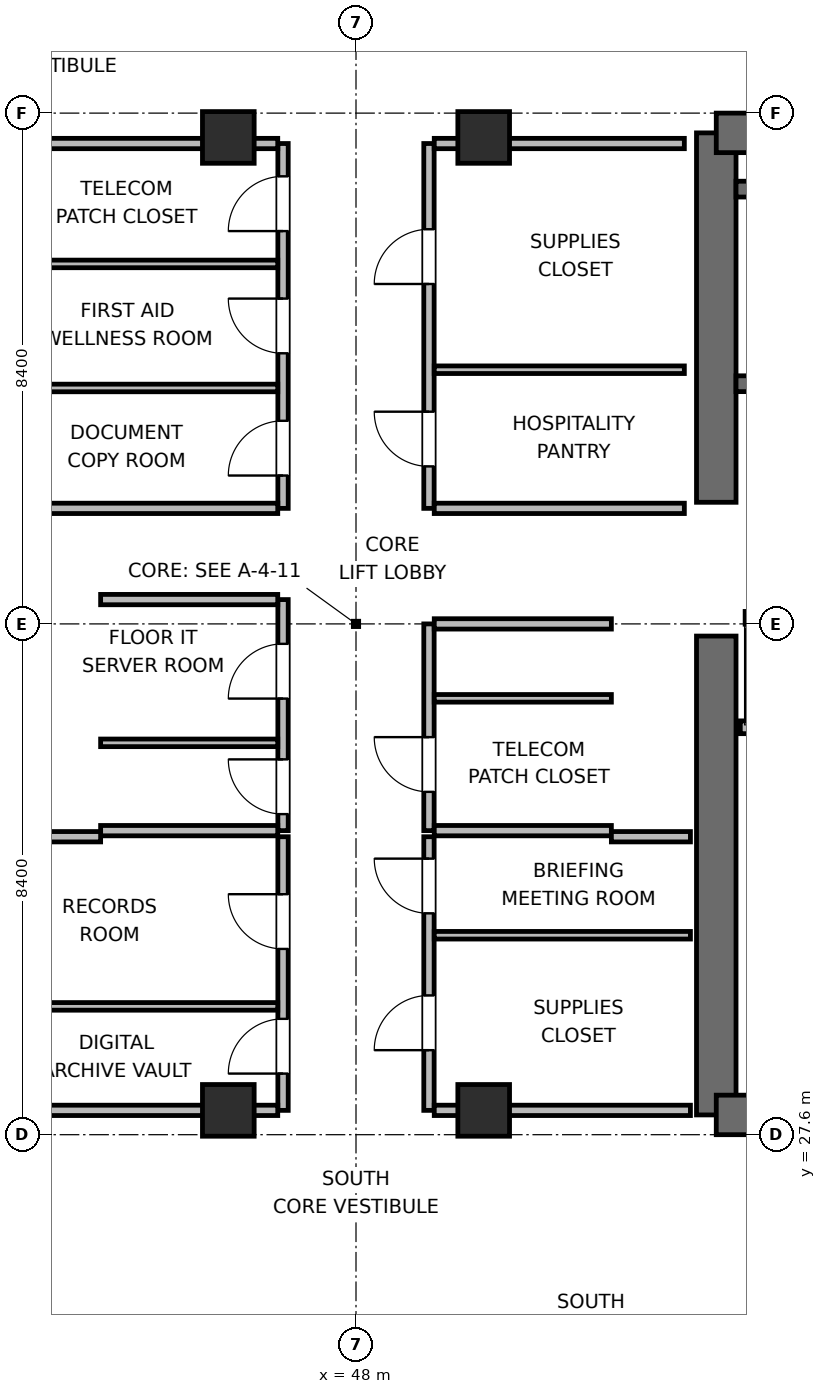
"""IFC4 building model, lengths in metres.
Left out: names, types, materials, properties, quantities, classifications, styles, units other than length and angle.
Written with IfcOpenShell. Run it as: python <this file> out.ifc"""

import sys

from ifc_helpers import new_model, si_unit, direction, frame, frame_2d, origin, origin_2d, place, context, subcontext, project, spatial, rectangle, extrude, element, fill, save


model = new_model("IFC4")
c1 = context("Model", 3, precision=1e-05, world=origin(), true_north=direction((0.0, 1.0)))
c2 = subcontext(c1, "Body", "Model", "MODEL_VIEW")
j1 = project(units=[si_unit("LENGTHUNIT", "METRE"), si_unit("PLANEANGLEUNIT", "RADIAN")], contexts=[c1])
p1 = place(None, origin())
s1 = spatial("IfcSite", under=j1, at=p1, CompositionType="ELEMENT")
p2 = place(p1, origin())
s2 = spatial("IfcBuilding", under=s1, at=p2, CompositionType="ELEMENT")
p3 = place(p2, frame((0.0, 0.0, 219.3)))
s3 = spatial("IfcBuildingStorey", under=s2, at=p3, CompositionType="ELEMENT", Elevation=219.3)
p4 = place(p3, frame((53.925, 27.925, 0.0), z_axis=(0.0, 0.0, 1.0), x_axis=(0.0, 1.0, 0.0)))
e1 = element("IfcWall", 1, at=p4, inside=s3, PredefinedType="SHEAR", context=c2, shape_type="SweptSolid", body=[
    extrude(rectangle(XDim=7.875, YDim=0.65, at=frame_2d((3.938, 0.0))), origin(), (0.0, 0.0, 1.0), 3.9),
])
p5 = place(p3, frame((53.925, 38.0, 0.0), z_axis=(0.0, 0.0, 1.0), x_axis=(0.0, 1.0, 0.0)))
e2 = element("IfcWall", 2, at=p5, inside=s3, PredefinedType="SHEAR", context=c2, shape_type="SweptSolid", body=[
    extrude(rectangle(XDim=6.075, YDim=0.65, at=frame_2d((3.038, 0.0))), origin(), (0.0, 0.0, 1.0), 3.9),
])
p6 = place(p3, frame((53.925, 27.925, 0.0), z_axis=(0.0, 0.0, 1.0), x_axis=(1.0, 0.0, 0.0)))
e3 = element("IfcWall", 3, at=p6, inside=s3, PredefinedType="SHEAR", context=c2, shape_type="SweptSolid", body=[
    extrude(rectangle(XDim=9.35, YDim=0.65, at=frame_2d((4.675, 0.0))), origin(), (0.0, 0.0, 1.0), 3.9),
])
p7 = place(p6, frame((3.975, 0.0, 0.0)))
e4 = element("IfcOpeningElement", 4, at=p7, cuts=e3, PredefinedType="OPENING", context=c2, shape_type="SweptSolid", body=[
    extrude(rectangle(XDim=1.05, YDim=2.04, at=frame_2d((0.525, 1.02))), frame((0.0, 0.335, 0.0), z_axis=(0.0, -1.0, 0.0), x_axis=(1.0, 0.0, 0.0)), (0.0, 0.0, 1.0), 0.67),
])
p8 = place(p3, frame((53.925, 44.075, 0.0), z_axis=(0.0, 0.0, 1.0), x_axis=(1.0, 0.0, 0.0)))
e5 = element("IfcWall", 5, at=p8, inside=s3, PredefinedType="SHEAR", context=c2, shape_type="SweptSolid", body=[
    extrude(rectangle(XDim=9.35, YDim=0.65, at=frame_2d((4.675, 0.0))), origin(), (0.0, 0.0, 1.0), 3.9),
])
p9 = place(p3, frame((54.25, 39.95, 0.0), z_axis=(0.0, 0.0, 1.0), x_axis=(1.0, 0.0, 0.0)))
e6 = element("IfcWall", 6, at=p9, inside=s3, PredefinedType="SHEAR", context=c2, shape_type="SweptSolid", body=[
    extrude(rectangle(XDim=8.7, YDim=0.26, at=frame_2d((4.35, 0.0))), origin(), (0.0, 0.0, 1.0), 3.9),
])
p10 = place(p9, frame((0.95, 0.0, 0.0)))
e7 = element("IfcOpeningElement", 7, at=p10, cuts=e6, PredefinedType="OPENING", context=c2, shape_type="SweptSolid", body=[
    extrude(rectangle(XDim=1.0, YDim=2.04, at=frame_2d((0.5, 1.02))), frame((0.0, 0.14, 0.0), z_axis=(0.0, -1.0, 0.0), x_axis=(1.0, 0.0, 0.0)), (0.0, 0.0, 1.0), 0.28),
])
p11 = place(p3, frame((54.25, 43.15, 0.0), z_axis=(0.0, 0.0, 1.0), x_axis=(1.0, 0.0, 0.0)))
e8 = element("IfcWall", 8, at=p11, inside=s3, PredefinedType="SHEAR", context=c2, shape_type="SweptSolid", body=[
    extrude(rectangle(XDim=8.7, YDim=0.26, at=frame_2d((4.35, 0.0))), origin(), (0.0, 0.0, 1.0), 3.9),
])
for number, where, z_axis, x_axis in (
    (9, (45.9, 28.0, 0.0), (0.0, 0.0, 1.0), (1.0, 0.0, 0.0)),
    (10, (50.1, 28.0, 0.0), (0.0, 0.0, 1.0), (1.0, 0.0, 0.0)),
    (11, (45.9, 44.0, 0.0), (0.0, 0.0, 1.0), (1.0, 0.0, 0.0)),
    (12, (50.1, 44.0, 0.0), (0.0, 0.0, 1.0), (1.0, 0.0, 0.0)),
):
    element("IfcColumn", number, at=place(p3, frame(where, z_axis=z_axis, x_axis=x_axis)), inside=s3, PredefinedType="COLUMN", context=c2, shape_type="SweptSolid", body=[
        extrude(rectangle(XDim=0.85, YDim=0.85, at=origin_2d()), origin(), (0.0, 0.0, 1.0), 3.9),
    ])
p12 = place(p3, frame((54.32, 34.3, 0.0), z_axis=(0.0, 0.0, 1.0), x_axis=(1.0, 0.0, 0.0)))
e13 = element("IfcWall", 13, at=p12, inside=s3, PredefinedType="PARTITIONING", context=c2, shape_type="SweptSolid", body=[
    extrude(rectangle(XDim=3.48, YDim=0.21, at=frame_2d((1.74, 0.0))), origin(), (0.0, 0.0, 1.0), 3.68),
])
p13 = place(p3, frame((54.4, 36.1, 0.0), z_axis=(0.0, 0.0, 1.0), x_axis=(1.0, 0.0, 0.0)))
e14 = element("IfcWall", 14, at=p13, inside=s3, PredefinedType="PARTITIONING", context=c2, shape_type="SweptSolid", body=[
    extrude(rectangle(XDim=2.1, YDim=0.21, at=frame_2d((1.05, 0.0))), origin(), (0.0, 0.0, 1.0), 3.68),
])
p14 = place(p13, frame((0.5, 0.0, 0.0)))
e15 = element("IfcOpeningElement", 15, at=p14, cuts=e14, PredefinedType="OPENING", context=c2, shape_type="SweptSolid", body=[
    extrude(rectangle(XDim=1.1, YDim=2.04, at=frame_2d((0.55, 1.02))), frame((0.0, 0.115, 0.0), z_axis=(0.0, -1.0, 0.0), x_axis=(1.0, 0.0, 0.0)), (0.0, 0.0, 1.0), 0.23),
])
p15 = place(p3, frame((46.8, 32.6, 0.0), z_axis=(0.0, 0.0, 1.0), x_axis=(0.0, 1.0, 0.0)))
e16 = element("IfcWall", 16, at=p15, inside=s3, PredefinedType="PARTITIONING", context=c2, shape_type="SweptSolid", body=[
    extrude(rectangle(XDim=3.8, YDim=0.17, at=frame_2d((1.9, 0.0))), origin(), (0.0, 0.0, 1.0), 3.68),
])
p16 = place(p15, frame((0.272, 0.0, 0.0)))
e17 = element("IfcOpeningElement", 17, at=p16, cuts=e16, PredefinedType="OPENING", context=c2, shape_type="SweptSolid", body=[
    extrude(rectangle(XDim=0.9, YDim=2.02, at=frame_2d((0.45, 1.01))), frame((0.0, 0.095, 0.0), z_axis=(0.0, -1.0, 0.0), x_axis=(1.0, 0.0, 0.0)), (0.0, 0.0, 1.0), 0.19),
])
p17 = place(p15, frame((2.172, 0.0, 0.0)))
e18 = element("IfcOpeningElement", 18, at=p17, cuts=e16, PredefinedType="OPENING", context=c2, shape_type="SweptSolid", body=[
    extrude(rectangle(XDim=0.9, YDim=2.02, at=frame_2d((0.45, 1.01))), frame((0.0, 0.095, 0.0), z_axis=(0.0, -1.0, 0.0), x_axis=(1.0, 0.0, 0.0)), (0.0, 0.0, 1.0), 0.19),
])
for number, where, z_axis, x_axis in (
    (19, (43.8, 32.6, 0.0), (0.0, 0.0, 1.0), (1.0, 0.0, 0.0)),
    (20, (43.8, 36.4, 0.0), (0.0, 0.0, 1.0), (1.0, 0.0, 0.0)),
):
    element("IfcWall", number, at=place(p3, frame(where, z_axis=z_axis, x_axis=x_axis)), inside=s3, PredefinedType="PARTITIONING", context=c2, shape_type="SweptSolid", body=[
        extrude(rectangle(XDim=2.913, YDim=0.17, at=frame_2d((1.457, 0.0))), origin(), (0.0, 0.0, 1.0), 3.68),
    ])
p18 = place(p3, frame((43.8, 34.044, 0.0), z_axis=(0.0, 0.0, 1.0), x_axis=(1.0, 0.0, 0.0)))
e21 = element("IfcWall", 21, at=p18, inside=s3, PredefinedType="PARTITIONING", context=c2, shape_type="SweptSolid", body=[
    extrude(rectangle(XDim=2.913, YDim=0.125, at=frame_2d((1.457, 0.0))), origin(), (0.0, 0.0, 1.0), 3.68),
])
p19 = place(p3, frame((49.2, 32.6, 0.0), z_axis=(0.0, 0.0, 1.0), x_axis=(0.0, 1.0, 0.0)))
e22 = element("IfcWall", 22, at=p19, inside=s3, PredefinedType="PARTITIONING", context=c2, shape_type="SweptSolid", body=[
    extrude(rectangle(XDim=3.4, YDim=0.17, at=frame_2d((1.7, 0.0))), origin(), (0.0, 0.0, 1.0), 3.68),
])
p20 = place(p19, frame((0.638, 0.0, 0.0)))
e23 = element("IfcOpeningElement", 23, at=p20, cuts=e22, PredefinedType="OPENING", context=c2, shape_type="SweptSolid", body=[
    extrude(rectangle(XDim=0.9, YDim=2.02, at=frame_2d((0.45, 1.01))), frame((0.0, 0.095, 0.0), z_axis=(0.0, -1.0, 0.0), x_axis=(1.0, 0.0, 0.0)), (0.0, 0.0, 1.0), 0.19),
])
for number, where, z_axis, x_axis in (
    (24, (49.287, 32.6, 0.0), (0.0, 0.0, 1.0), (1.0, 0.0, 0.0)),
    (25, (49.287, 36.0, 0.0), (0.0, 0.0, 1.0), (1.0, 0.0, 0.0)),
):
    element("IfcWall", number, at=place(p3, frame(where, z_axis=z_axis, x_axis=x_axis)), inside=s3, PredefinedType="PARTITIONING", context=c2, shape_type="SweptSolid", body=[
        extrude(rectangle(XDim=2.913, YDim=0.17, at=frame_2d((1.457, 0.0))), origin(), (0.0, 0.0, 1.0), 3.68),
    ])
p21 = place(p3, frame((49.287, 34.776, 0.0), z_axis=(0.0, 0.0, 1.0), x_axis=(1.0, 0.0, 0.0)))
e26 = element("IfcWall", 26, at=p21, inside=s3, PredefinedType="PARTITIONING", context=c2, shape_type="SweptSolid", body=[
    extrude(rectangle(XDim=2.913, YDim=0.125, at=frame_2d((1.457, 0.0))), origin(), (0.0, 0.0, 1.0), 3.68),
])
p22 = place(p3, frame((46.8, 28.0, 0.0), z_axis=(0.0, 0.0, 1.0), x_axis=(0.0, 1.0, 0.0)))
e27 = element("IfcWall", 27, at=p22, inside=s3, PredefinedType="PARTITIONING", context=c2, shape_type="SweptSolid", body=[
    extrude(rectangle(XDim=4.5, YDim=0.17, at=frame_2d((2.25, 0.0))), origin(), (0.0, 0.0, 1.0), 3.68),
])
p23 = place(p22, frame((0.605, 0.0, 0.0)))
e28 = element("IfcOpeningElement", 28, at=p23, cuts=e27, PredefinedType="OPENING", context=c2, shape_type="SweptSolid", body=[
    extrude(rectangle(XDim=0.9, YDim=2.02, at=frame_2d((0.45, 1.01))), frame((0.0, 0.095, 0.0), z_axis=(0.0, -1.0, 0.0), x_axis=(1.0, 0.0, 0.0)), (0.0, 0.0, 1.0), 0.19),
])
p24 = place(p22, frame((2.655, 0.0, 0.0)))
e29 = element("IfcOpeningElement", 29, at=p24, cuts=e27, PredefinedType="OPENING", context=c2, shape_type="SweptSolid", body=[
    extrude(rectangle(XDim=0.9, YDim=2.02, at=frame_2d((0.45, 1.01))), frame((0.0, 0.095, 0.0), z_axis=(0.0, -1.0, 0.0), x_axis=(1.0, 0.0, 0.0)), (0.0, 0.0, 1.0), 0.19),
])
p25 = place(p3, frame((42.5, 28.0, 0.0), z_axis=(0.0, 0.0, 1.0), x_axis=(1.0, 0.0, 0.0)))
e30 = element("IfcWall", 30, at=p25, inside=s3, PredefinedType="PARTITIONING", context=c2, shape_type="SweptSolid", body=[
    extrude(rectangle(XDim=4.213, YDim=0.17, at=frame_2d((2.106, 0.0))), origin(), (0.0, 0.0, 1.0), 2.765),
])
p26 = place(p3, frame((42.5, 32.5, 0.0), z_axis=(0.0, 0.0, 1.0), x_axis=(1.0, 0.0, 0.0)))
e31 = element("IfcWall", 31, at=p26, inside=s3, PredefinedType="PARTITIONING", context=c2, shape_type="SweptSolid", body=[
    extrude(rectangle(XDim=1.3, YDim=0.17, at=frame_2d((0.65, 0.0))), origin(), (0.0, 0.0, 1.0), 3.68),
])
p27 = place(p3, frame((42.5, 29.71, 0.0), z_axis=(0.0, 0.0, 1.0), x_axis=(1.0, 0.0, 0.0)))
e32 = element("IfcWall", 32, at=p27, inside=s3, PredefinedType="PARTITIONING", context=c2, shape_type="SweptSolid", body=[
    extrude(rectangle(XDim=4.213, YDim=0.125, at=frame_2d((2.106, 0.0))), origin(), (0.0, 0.0, 1.0), 3.68),
])
p28 = place(p3, frame((49.2, 28.0, 0.0), z_axis=(0.0, 0.0, 1.0), x_axis=(0.0, 1.0, 0.0)))
e33 = element("IfcWall", 33, at=p28, inside=s3, PredefinedType="PARTITIONING", context=c2, shape_type="SweptSolid", body=[
    extrude(rectangle(XDim=4.5, YDim=0.17, at=frame_2d((2.25, 0.0))), origin(), (0.0, 0.0, 1.0), 3.68),
])
p29 = place(p28, frame((0.99, 0.0, 0.0)))
e34 = element("IfcOpeningElement", 34, at=p29, cuts=e33, PredefinedType="OPENING", context=c2, shape_type="SweptSolid", body=[
    extrude(rectangle(XDim=0.9, YDim=2.02, at=frame_2d((0.45, 1.01))), frame((0.0, 0.095, 0.0), z_axis=(0.0, -1.0, 0.0), x_axis=(1.0, 0.0, 0.0)), (0.0, 0.0, 1.0), 0.19),
])
p30 = place(p28, frame((3.24, 0.0, 0.0)))
e35 = element("IfcOpeningElement", 35, at=p30, cuts=e33, PredefinedType="OPENING", context=c2, shape_type="SweptSolid", body=[
    extrude(rectangle(XDim=0.9, YDim=2.02, at=frame_2d((0.45, 1.01))), frame((0.0, 0.095, 0.0), z_axis=(0.0, -1.0, 0.0), x_axis=(1.0, 0.0, 0.0)), (0.0, 0.0, 1.0), 0.19),
])
p31 = place(p3, frame((49.287, 28.0, 0.0), z_axis=(0.0, 0.0, 1.0), x_axis=(1.0, 0.0, 0.0)))
e36 = element("IfcWall", 36, at=p31, inside=s3, PredefinedType="PARTITIONING", context=c2, shape_type="SweptSolid", body=[
    extrude(rectangle(XDim=4.213, YDim=0.17, at=frame_2d((2.106, 0.0))), origin(), (0.0, 0.0, 1.0), 2.765),
])
p32 = place(p3, frame((52.2, 32.5, 0.0), z_axis=(0.0, 0.0, 1.0), x_axis=(1.0, 0.0, 0.0)))
e37 = element("IfcWall", 37, at=p32, inside=s3, PredefinedType="PARTITIONING", context=c2, shape_type="SweptSolid", body=[
    extrude(rectangle(XDim=1.3, YDim=0.17, at=frame_2d((0.65, 0.0))), origin(), (0.0, 0.0, 1.0), 3.68),
])
p33 = place(p3, frame((49.287, 30.88, 0.0), z_axis=(0.0, 0.0, 1.0), x_axis=(1.0, 0.0, 0.0)))
e38 = element("IfcWall", 38, at=p33, inside=s3, PredefinedType="PARTITIONING", context=c2, shape_type="SweptSolid", body=[
    extrude(rectangle(XDim=4.213, YDim=0.125, at=frame_2d((2.106, 0.0))), origin(), (0.0, 0.0, 1.0), 3.68),
])
p34 = place(p3, frame((46.8, 37.9, 0.0), z_axis=(0.0, 0.0, 1.0), x_axis=(0.0, 1.0, 0.0)))
e39 = element("IfcWall", 39, at=p34, inside=s3, PredefinedType="PARTITIONING", context=c2, shape_type="SweptSolid", body=[
    extrude(rectangle(XDim=6.0, YDim=0.17, at=frame_2d((3.0, 0.0))), origin(), (0.0, 0.0, 1.0), 3.68),
])
p35 = place(p34, frame((0.54, 0.0, 0.0)))
e40 = element("IfcOpeningElement", 40, at=p35, cuts=e39, PredefinedType="OPENING", context=c2, shape_type="SweptSolid", body=[
    extrude(rectangle(XDim=0.9, YDim=2.02, at=frame_2d((0.45, 1.01))), frame((0.0, 0.095, 0.0), z_axis=(0.0, -1.0, 0.0), x_axis=(1.0, 0.0, 0.0)), (0.0, 0.0, 1.0), 0.19),
])
p36 = place(p34, frame((2.55, 0.0, 0.0)))
e41 = element("IfcOpeningElement", 41, at=p36, cuts=e39, PredefinedType="OPENING", context=c2, shape_type="SweptSolid", body=[
    extrude(rectangle(XDim=0.9, YDim=2.02, at=frame_2d((0.45, 1.01))), frame((0.0, 0.095, 0.0), z_axis=(0.0, -1.0, 0.0), x_axis=(1.0, 0.0, 0.0)), (0.0, 0.0, 1.0), 0.19),
])
p37 = place(p34, frame((4.56, 0.0, 0.0)))
e42 = element("IfcOpeningElement", 42, at=p37, cuts=e39, PredefinedType="OPENING", context=c2, shape_type="SweptSolid", body=[
    extrude(rectangle(XDim=0.9, YDim=2.02, at=frame_2d((0.45, 1.01))), frame((0.0, 0.095, 0.0), z_axis=(0.0, -1.0, 0.0), x_axis=(1.0, 0.0, 0.0)), (0.0, 0.0, 1.0), 0.19),
])
p38 = place(p3, frame((42.5, 37.9, 0.0), z_axis=(0.0, 0.0, 1.0), x_axis=(1.0, 0.0, 0.0)))
e43 = element("IfcWall", 43, at=p38, inside=s3, PredefinedType="PARTITIONING", context=c2, shape_type="SweptSolid", body=[
    extrude(rectangle(XDim=4.213, YDim=0.17, at=frame_2d((2.106, 0.0))), origin(), (0.0, 0.0, 1.0), 3.68),
])
p39 = place(p3, frame((42.5, 43.9, 0.0), z_axis=(0.0, 0.0, 1.0), x_axis=(1.0, 0.0, 0.0)))
e44 = element("IfcWall", 44, at=p39, inside=s3, PredefinedType="PARTITIONING", context=c2, shape_type="SweptSolid", body=[
    extrude(rectangle(XDim=4.213, YDim=0.17, at=frame_2d((2.106, 0.0))), origin(), (0.0, 0.0, 1.0), 2.765),
])
for number, where, z_axis, x_axis in (
    (45, (42.5, 39.88, 0.0), (0.0, 0.0, 1.0), (1.0, 0.0, 0.0)),
    (46, (42.5, 41.92, 0.0), (0.0, 0.0, 1.0), (1.0, 0.0, 0.0)),
):
    element("IfcWall", number, at=place(p3, frame(where, z_axis=z_axis, x_axis=x_axis)), inside=s3, PredefinedType="PARTITIONING", context=c2, shape_type="SweptSolid", body=[
        extrude(rectangle(XDim=4.213, YDim=0.125, at=frame_2d((2.106, 0.0))), origin(), (0.0, 0.0, 1.0), 3.68),
    ])
p40 = place(p3, frame((49.2, 37.9, 0.0), z_axis=(0.0, 0.0, 1.0), x_axis=(0.0, 1.0, 0.0)))
e47 = element("IfcWall", 47, at=p40, inside=s3, PredefinedType="PARTITIONING", context=c2, shape_type="SweptSolid", body=[
    extrude(rectangle(XDim=6.0, YDim=0.17, at=frame_2d((3.0, 0.0))), origin(), (0.0, 0.0, 1.0), 3.68),
])
p41 = place(p40, frame((0.69, 0.0, 0.0)))
e48 = element("IfcOpeningElement", 48, at=p41, cuts=e47, PredefinedType="OPENING", context=c2, shape_type="SweptSolid", body=[
    extrude(rectangle(XDim=0.9, YDim=2.02, at=frame_2d((0.45, 1.01))), frame((0.0, 0.095, 0.0), z_axis=(0.0, -1.0, 0.0), x_axis=(1.0, 0.0, 0.0)), (0.0, 0.0, 1.0), 0.19),
])
p42 = place(p40, frame((3.69, 0.0, 0.0)))
e49 = element("IfcOpeningElement", 49, at=p42, cuts=e47, PredefinedType="OPENING", context=c2, shape_type="SweptSolid", body=[
    extrude(rectangle(XDim=0.9, YDim=2.02, at=frame_2d((0.45, 1.01))), frame((0.0, 0.095, 0.0), z_axis=(0.0, -1.0, 0.0), x_axis=(1.0, 0.0, 0.0)), (0.0, 0.0, 1.0), 0.19),
])
p43 = place(p3, frame((49.287, 37.9, 0.0), z_axis=(0.0, 0.0, 1.0), x_axis=(1.0, 0.0, 0.0)))
e50 = element("IfcWall", 50, at=p43, inside=s3, PredefinedType="PARTITIONING", context=c2, shape_type="SweptSolid", body=[
    extrude(rectangle(XDim=4.113, YDim=0.17, at=frame_2d((2.056, 0.0))), origin(), (0.0, 0.0, 1.0), 3.68),
])
p44 = place(p3, frame((49.287, 43.9, 0.0), z_axis=(0.0, 0.0, 1.0), x_axis=(1.0, 0.0, 0.0)))
e51 = element("IfcWall", 51, at=p44, inside=s3, PredefinedType="PARTITIONING", context=c2, shape_type="SweptSolid", body=[
    extrude(rectangle(XDim=4.113, YDim=0.17, at=frame_2d((2.056, 0.0))), origin(), (0.0, 0.0, 1.0), 2.765),
])
p45 = place(p3, frame((49.287, 40.18, 0.0), z_axis=(0.0, 0.0, 1.0), x_axis=(1.0, 0.0, 0.0)))
e52 = element("IfcWall", 52, at=p45, inside=s3, PredefinedType="PARTITIONING", context=c2, shape_type="SweptSolid", body=[
    extrude(rectangle(XDim=4.113, YDim=0.125, at=frame_2d((2.056, 0.0))), origin(), (0.0, 0.0, 1.0), 3.68),
])
p46 = place(p16, origin())
e53 = element("IfcDoor", 53, at=p46, inside=s3, OperationType="SINGLE_SWING_RIGHT", PredefinedType="DOOR", context=c2, shape_type="SweptSolid", body=[
    extrude(rectangle(XDim=0.9, YDim=2.02, at=frame_2d((0.45, 1.01))), frame((0.0, 0.025, 0.0), z_axis=(0.0, -1.0, 0.0), x_axis=(1.0, 0.0, 0.0)), (0.0, 0.0, 1.0), 0.05),
])
fill(e17, e53)
p47 = place(p17, origin())
e54 = element("IfcDoor", 54, at=p47, inside=s3, OperationType="SINGLE_SWING_LEFT", PredefinedType="DOOR", context=c2, shape_type="SweptSolid", body=[
    extrude(rectangle(XDim=0.9, YDim=2.02, at=frame_2d((0.45, 1.01))), frame((0.0, 0.025, 0.0), z_axis=(0.0, -1.0, 0.0), x_axis=(1.0, 0.0, 0.0)), (0.0, 0.0, 1.0), 0.05),
])
fill(e18, e54)
p48 = place(p20, origin())
e55 = element("IfcDoor", 55, at=p48, inside=s3, OperationType="SINGLE_SWING_RIGHT", PredefinedType="DOOR", context=c2, shape_type="SweptSolid", body=[
    extrude(rectangle(XDim=0.9, YDim=2.02, at=frame_2d((0.45, 1.01))), frame((0.0, 0.025, 0.0), z_axis=(0.0, -1.0, 0.0), x_axis=(1.0, 0.0, 0.0)), (0.0, 0.0, 1.0), 0.05),
])
fill(e23, e55)
p49 = place(p23, origin())
e56 = element("IfcDoor", 56, at=p49, inside=s3, OperationType="SINGLE_SWING_LEFT", PredefinedType="DOOR", context=c2, shape_type="SweptSolid", body=[
    extrude(rectangle(XDim=0.9, YDim=2.02, at=frame_2d((0.45, 1.01))), frame((0.0, 0.025, 0.0), z_axis=(0.0, -1.0, 0.0), x_axis=(1.0, 0.0, 0.0)), (0.0, 0.0, 1.0), 0.05),
])
fill(e28, e56)
p50 = place(p24, origin())
e57 = element("IfcDoor", 57, at=p50, inside=s3, OperationType="SINGLE_SWING_RIGHT", PredefinedType="DOOR", context=c2, shape_type="SweptSolid", body=[
    extrude(rectangle(XDim=0.9, YDim=2.02, at=frame_2d((0.45, 1.01))), frame((0.0, 0.025, 0.0), z_axis=(0.0, -1.0, 0.0), x_axis=(1.0, 0.0, 0.0)), (0.0, 0.0, 1.0), 0.05),
])
fill(e29, e57)
p51 = place(p29, origin())
e58 = element("IfcDoor", 58, at=p51, inside=s3, OperationType="SINGLE_SWING_LEFT", PredefinedType="DOOR", context=c2, shape_type="SweptSolid", body=[
    extrude(rectangle(XDim=0.9, YDim=2.02, at=frame_2d((0.45, 1.01))), frame((0.0, 0.025, 0.0), z_axis=(0.0, -1.0, 0.0), x_axis=(1.0, 0.0, 0.0)), (0.0, 0.0, 1.0), 0.05),
])
fill(e34, e58)
p52 = place(p30, origin())
e59 = element("IfcDoor", 59, at=p52, inside=s3, OperationType="SINGLE_SWING_RIGHT", PredefinedType="DOOR", context=c2, shape_type="SweptSolid", body=[
    extrude(rectangle(XDim=0.9, YDim=2.02, at=frame_2d((0.45, 1.01))), frame((0.0, 0.025, 0.0), z_axis=(0.0, -1.0, 0.0), x_axis=(1.0, 0.0, 0.0)), (0.0, 0.0, 1.0), 0.05),
])
fill(e35, e59)
p53 = place(p35, origin())
e60 = element("IfcDoor", 60, at=p53, inside=s3, OperationType="SINGLE_SWING_LEFT", PredefinedType="DOOR", context=c2, shape_type="SweptSolid", body=[
    extrude(rectangle(XDim=0.9, YDim=2.02, at=frame_2d((0.45, 1.01))), frame((0.0, 0.025, 0.0), z_axis=(0.0, -1.0, 0.0), x_axis=(1.0, 0.0, 0.0)), (0.0, 0.0, 1.0), 0.05),
])
fill(e40, e60)
p54 = place(p36, origin())
e61 = element("IfcDoor", 61, at=p54, inside=s3, OperationType="SINGLE_SWING_RIGHT", PredefinedType="DOOR", context=c2, shape_type="SweptSolid", body=[
    extrude(rectangle(XDim=0.9, YDim=2.02, at=frame_2d((0.45, 1.01))), frame((0.0, 0.025, 0.0), z_axis=(0.0, -1.0, 0.0), x_axis=(1.0, 0.0, 0.0)), (0.0, 0.0, 1.0), 0.05),
])
fill(e41, e61)
p55 = place(p37, origin())
e62 = element("IfcDoor", 62, at=p55, inside=s3, OperationType="SINGLE_SWING_LEFT", PredefinedType="DOOR", context=c2, shape_type="SweptSolid", body=[
    extrude(rectangle(XDim=0.9, YDim=2.02, at=frame_2d((0.45, 1.01))), frame((0.0, 0.025, 0.0), z_axis=(0.0, -1.0, 0.0), x_axis=(1.0, 0.0, 0.0)), (0.0, 0.0, 1.0), 0.05),
])
fill(e42, e62)
p56 = place(p41, origin())
e63 = element("IfcDoor", 63, at=p56, inside=s3, OperationType="SINGLE_SWING_RIGHT", PredefinedType="DOOR", context=c2, shape_type="SweptSolid", body=[
    extrude(rectangle(XDim=0.9, YDim=2.02, at=frame_2d((0.45, 1.01))), frame((0.0, 0.025, 0.0), z_axis=(0.0, -1.0, 0.0), x_axis=(1.0, 0.0, 0.0)), (0.0, 0.0, 1.0), 0.05),
])
fill(e48, e63)
p57 = place(p42, origin())
e64 = element("IfcDoor", 64, at=p57, inside=s3, OperationType="SINGLE_SWING_LEFT", PredefinedType="DOOR", context=c2, shape_type="SweptSolid", body=[
    extrude(rectangle(XDim=0.9, YDim=2.02, at=frame_2d((0.45, 1.01))), frame((0.0, 0.025, 0.0), z_axis=(0.0, -1.0, 0.0), x_axis=(1.0, 0.0, 0.0)), (0.0, 0.0, 1.0), 0.05),
])
fill(e49, e64)
save(model, sys.argv[1])
